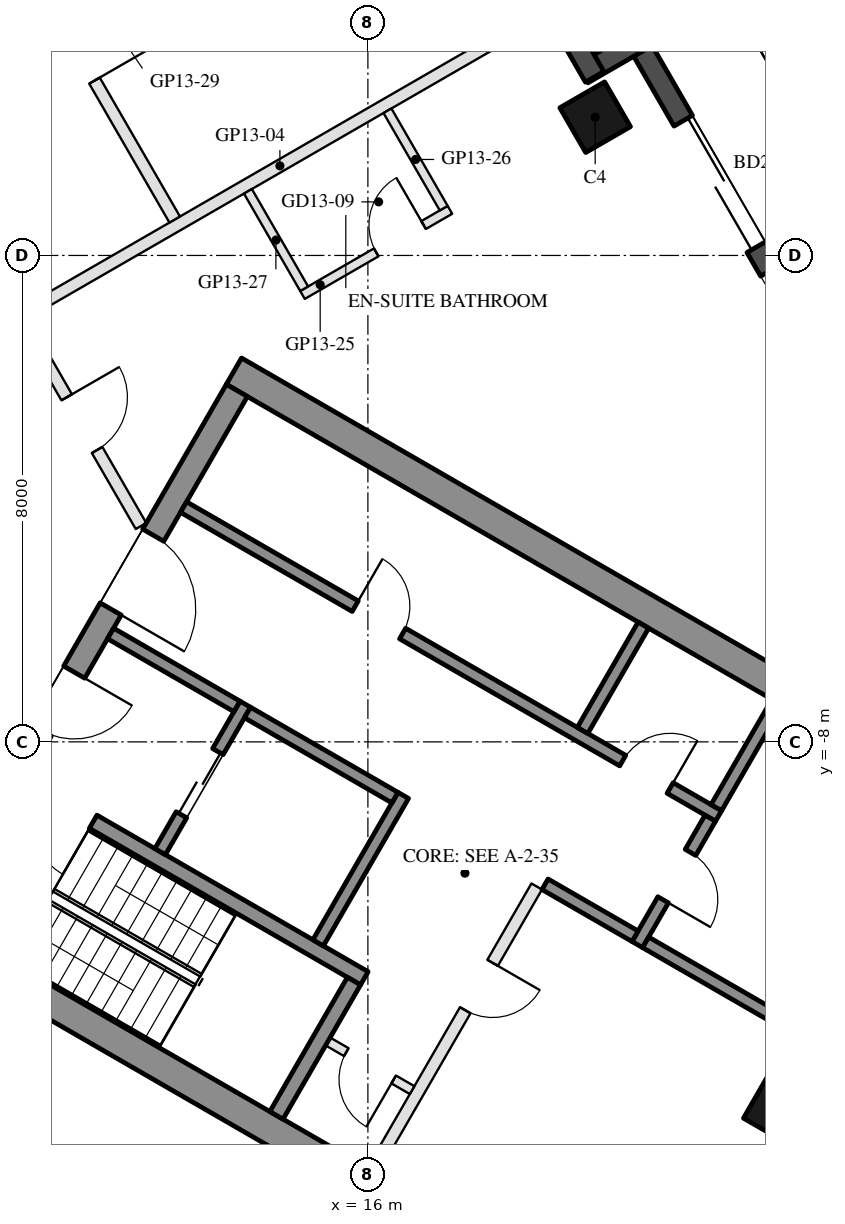
"""IFC4 building model, lengths in metres.
Left out: names, types, materials, properties, quantities, classifications, styles, units other than length and angle.
Written with IfcOpenShell. Run it as: python <this file> out.ifc"""

import sys

from ifc_helpers import new_model, si_unit, direction, frame, frame_2d, origin, origin_2d, place, context, subcontext, project, spatial, rectangle, hollow_rectangle, extrude, element, fill, save


model = new_model("IFC4")
c1 = context("Model", 3, precision=1e-05, world=origin(), true_north=direction((0.0, 1.0)))
c2 = subcontext(c1, "Body", "Model", "MODEL_VIEW")
j1 = project(units=[si_unit("LENGTHUNIT", "METRE"), si_unit("PLANEANGLEUNIT", "RADIAN")], contexts=[c1])
p1 = place(None, origin())
s1 = spatial("IfcSite", under=j1, at=p1, CompositionType="ELEMENT")
p2 = place(p1, origin())
s2 = spatial("IfcBuilding", under=s1, at=p2, CompositionType="ELEMENT")
p3 = place(p2, frame((0.0, 0.0, 154.0)))
s3 = spatial("IfcBuildingStorey", under=s2, at=p3, CompositionType="ELEMENT", Elevation=154.0)
p4 = place(p3, frame((19.738, 2.273, 0.0), z_axis=(0.0, 0.0, 1.0), x_axis=(-0.5, 0.866025403784, 0.0)))
e1 = element("IfcColumn", 1, at=p4, inside=s3, PredefinedType="COLUMN", context=c2, shape_type="SweptSolid", body=[
    extrude(hollow_rectangle(XDim=0.85, YDim=0.85, WallThickness=0.04, at=origin_2d()), origin(), (0.0, 0.0, 1.0), 3.7),
])
p5 = place(p3, frame((23.729, -13.7, 0.0), z_axis=(0.0, 0.0, 1.0), x_axis=(0.5, 0.866025403784, 0.0)))
e2 = element("IfcColumn", 2, at=p5, inside=s3, PredefinedType="COLUMN", context=c2, shape_type="SweptSolid", body=[
    extrude(hollow_rectangle(XDim=2.4, YDim=2.2, WallThickness=0.06, at=origin_2d()), origin(), (0.0, 0.0, 1.0), 3.7),
])
p6 = place(p3, frame((26.257, -6.567, 0.0), z_axis=(0.0, 0.0, 1.0), x_axis=(-0.500023526245, 0.866011820475, 0.0)))
e3 = element("IfcWall", 3, at=p6, inside=s3, PredefinedType="SOLIDWALL", context=c2, shape_type="SweptSolid", body=[
    extrude(rectangle(XDim=11.816, YDim=0.35, at=frame_2d((5.908, 0.0))), origin(), (0.0, 0.0, 1.0), 3.55),
])
p7 = place(p6, frame((0.38, 0.0, 0.3)))
e4 = element("IfcOpeningElement", 4, at=p7, cuts=e3, PredefinedType="OPENING", context=c2, shape_type="SweptSolid", body=[
    extrude(rectangle(XDim=1.8, YDim=2.65, at=frame_2d((0.9, 1.325))), frame((0.0, 0.185, 0.0), z_axis=(0.0, -1.0, 0.0), x_axis=(1.0, 0.0, 0.0)), (0.0, 0.0, 1.0), 0.37),
])
p8 = place(p6, frame((7.741, 0.0, 0.0)))
e5 = element("IfcOpeningElement", 5, at=p8, cuts=e3, PredefinedType="OPENING", context=c2, shape_type="SweptSolid", body=[
    extrude(rectangle(XDim=2.4, YDim=2.4, at=frame_2d((1.2, 1.2))), frame((0.0, 0.185, 0.0), z_axis=(0.0, -1.0, 0.0), x_axis=(1.0, 0.0, 0.0)), (0.0, 0.0, 1.0), 0.37),
])
p9 = place(p6, frame((3.791, 0.0, 0.3)))
e6 = element("IfcOpeningElement", 6, at=p9, cuts=e3, PredefinedType="OPENING", context=c2, shape_type="SweptSolid", body=[
    extrude(rectangle(XDim=1.6, YDim=2.65, at=frame_2d((0.8, 1.325))), frame((0.0, 0.185, 0.0), z_axis=(0.0, -1.0, 0.0), x_axis=(1.0, 0.0, 0.0)), (0.0, 0.0, 1.0), 0.37),
])
p10 = place(p6, frame((5.691, 0.0, 0.3)))
e7 = element("IfcOpeningElement", 7, at=p10, cuts=e3, PredefinedType="OPENING", context=c2, shape_type="SweptSolid", body=[
    extrude(rectangle(XDim=1.6, YDim=2.65, at=frame_2d((0.8, 1.325))), frame((0.0, 0.185, 0.0), z_axis=(0.0, -1.0, 0.0), x_axis=(1.0, 0.0, 0.0)), (0.0, 0.0, 1.0), 0.37),
])
p11 = place(p3, frame((20.588, 3.601, 0.0), z_axis=(0.0, 0.0, 1.0), x_axis=(-0.866005645448, -0.500034220881, 0.0)))
e8 = element("IfcWall", 8, at=p11, inside=s3, PredefinedType="SOLIDWALL", context=c2, shape_type="SweptSolid", body=[
    extrude(rectangle(XDim=1.22, YDim=0.35, at=frame_2d((0.61, 0.0))), origin(), (0.0, 0.0, 1.0), 3.55),
])
p12 = place(p3, frame((19.729, 2.938, 0.0), z_axis=(0.0, 0.0, 1.0), x_axis=(-0.499976430342, 0.866039011305, 0.0)))
e9 = element("IfcWall", 9, at=p12, inside=s3, PredefinedType="SOLIDWALL", context=c2, shape_type="SweptSolid", body=[
    extrude(rectangle(XDim=6.74, YDim=0.35, at=frame_2d((3.37, 0.0))), origin(), (0.0, 0.0, 1.0), 3.55),
])
p13 = place(p12, frame((1.77, 0.0, 0.0)))
e10 = element("IfcOpeningElement", 10, at=p13, cuts=e9, PredefinedType="OPENING", context=c2, shape_type="SweptSolid", body=[
    extrude(rectangle(XDim=2.4, YDim=2.4, at=frame_2d((1.2, 1.2))), frame((0.0, 0.185, 0.0), z_axis=(0.0, -1.0, 0.0), x_axis=(1.0, 0.0, 0.0)), (0.0, 0.0, 1.0), 0.37),
])
p14 = place(p12, frame((4.47, 0.0, 0.3)))
e11 = element("IfcOpeningElement", 11, at=p14, cuts=e9, PredefinedType="OPENING", context=c2, shape_type="SweptSolid", body=[
    extrude(rectangle(XDim=1.5, YDim=2.65, at=frame_2d((0.75, 1.325))), frame((0.0, 0.185, 0.0), z_axis=(0.0, -1.0, 0.0), x_axis=(1.0, 0.0, 0.0)), (0.0, 0.0, 1.0), 0.37),
])
for number, where, z_axis, x_axis in (
    (12, (8.547, -10.997, 0.0), (0.0, 0.0, 1.0), (0.866, -0.5, 0.0)),
    (13, (13.797, -1.903, 0.0), (0.0, 0.0, 1.0), (0.866, -0.5, 0.0)),
):
    element("IfcWall", number, at=place(p3, frame(where, z_axis=z_axis, x_axis=x_axis)), inside=s3, PredefinedType="SHEAR", context=c2, shape_type="SweptSolid", body=[
        extrude(rectangle(XDim=14.837, YDim=0.5, at=frame_2d((7.418, 0.0))), origin(), (0.0, 0.0, 1.0), 3.5),
    ])
p15 = place(p3, frame((8.845, -10.88, 0.0), z_axis=(0.0, 0.0, 1.0), x_axis=(0.500004234368, 0.866022959057, 0.0)))
e14 = element("IfcWall", 14, at=p15, inside=s3, PredefinedType="SHEAR", context=c2, shape_type="SweptSolid", body=[
    extrude(rectangle(XDim=10.0, YDim=0.4, at=frame_2d((5.0, 0.0))), origin(), (0.0, 0.0, 1.0), 3.5),
])
p16 = place(p15, frame((3.55, 0.0, 0.0)))
e15 = element("IfcOpeningElement", 15, at=p16, cuts=e14, PredefinedType="OPENING", context=c2, shape_type="SweptSolid", body=[
    extrude(rectangle(XDim=1.1, YDim=2.1, at=frame_2d((0.55, 1.05))), frame((0.0, 0.21, 0.0), z_axis=(0.0, -1.0, 0.0), x_axis=(1.0, 0.0, 0.0)), (0.0, 0.0, 1.0), 0.42),
])
p17 = place(p15, frame((5.85, 0.0, 0.0)))
e16 = element("IfcOpeningElement", 16, at=p17, cuts=e14, PredefinedType="OPENING", context=c2, shape_type="SweptSolid", body=[
    extrude(rectangle(XDim=1.4, YDim=2.1, at=frame_2d((0.7, 1.05))), frame((0.0, 0.21, 0.0), z_axis=(0.0, -1.0, 0.0), x_axis=(1.0, 0.0, 0.0)), (0.0, 0.0, 1.0), 0.42),
])
p18 = place(p3, frame((10.356, -8.664, 0.0), z_axis=(0.0, 0.0, 1.0), x_axis=(0.866028629588, -0.499994412703, 0.0)))
e17 = element("IfcWall", 17, at=p18, inside=s3, PredefinedType="SHEAR", context=c2, shape_type="SweptSolid", body=[
    extrude(rectangle(XDim=6.45, YDim=0.25, at=frame_2d((3.225, 0.0))), origin(), (0.0, 0.0, 1.0), 3.5),
])
p19 = place(p18, frame((0.3, 0.0, 0.0)))
e18 = element("IfcOpeningElement", 18, at=p19, cuts=e17, PredefinedType="OPENING", context=c2, shape_type="SweptSolid", body=[
    extrude(rectangle(XDim=1.0, YDim=2.1, at=frame_2d((0.5, 1.05))), frame((0.0, 0.135, 0.0), z_axis=(0.0, -1.0, 0.0), x_axis=(1.0, 0.0, 0.0)), (0.0, 0.0, 1.0), 0.27),
])
p20 = place(p3, frame((14.496, -14.143, 0.0), z_axis=(0.0, 0.0, 1.0), x_axis=(0.500062241894, 0.865989465428, 0.0)))
e19 = element("IfcWall", 19, at=p20, inside=s3, PredefinedType="SHEAR", context=c2, shape_type="SweptSolid", body=[
    extrude(rectangle(XDim=2.55, YDim=0.25, at=frame_2d((1.275, 0.0))), origin(), (0.0, 0.0, 1.0), 3.5),
])
p21 = place(p3, frame((15.181, -11.305, 0.0), z_axis=(0.0, 0.0, 1.0), x_axis=(0.49994636267, 0.866056369097, 0.0)))
e20 = element("IfcWall", 20, at=p21, inside=s3, PredefinedType="SHEAR", context=c2, shape_type="SweptSolid", body=[
    extrude(rectangle(XDim=2.8, YDim=0.2, at=frame_2d((1.4, 0.0))), origin(), (0.0, 0.0, 1.0), 3.5),
])
p22 = place(p3, frame((12.583, -9.805, 0.0), z_axis=(0.0, 0.0, 1.0), x_axis=(0.49994636267, 0.866056369097, 0.0)))
e21 = element("IfcWall", 21, at=p22, inside=s3, PredefinedType="SHEAR", context=c2, shape_type="SweptSolid", body=[
    extrude(rectangle(XDim=2.8, YDim=0.2, at=frame_2d((1.4, 0.0))), origin(), (0.0, 0.0, 1.0), 3.5),
])
p23 = place(p22, frame((0.7, 0.0, 0.0)))
e22 = element("IfcOpeningElement", 22, at=p23, cuts=e21, PredefinedType="OPENING", context=c2, shape_type="SweptSolid", body=[
    extrude(rectangle(XDim=1.2, YDim=2.1, at=frame_2d((0.6, 1.05))), frame((0.0, 0.11, 0.0), z_axis=(0.0, -1.0, 0.0), x_axis=(1.0, 0.0, 0.0)), (0.0, 0.0, 1.0), 0.22),
])
p24 = place(p3, frame((11.768, -6.217, 0.0), z_axis=(0.0, 0.0, 1.0), x_axis=(0.866050077142, -0.499957262057, 0.0)))
e23 = element("IfcWall", 23, at=p24, inside=s3, PredefinedType="SHEAR", context=c2, shape_type="SweptSolid", body=[
    extrude(rectangle(XDim=2.4, YDim=0.2, at=frame_2d((1.2, 0.0))), origin(), (0.0, 0.0, 1.0), 3.5),
])
p25 = place(p3, frame((14.02, -7.517, 0.0), z_axis=(0.0, 0.0, 1.0), x_axis=(0.866034573852, -0.49998411664, 0.0)))
e24 = element("IfcWall", 24, at=p25, inside=s3, PredefinedType="SHEAR", context=c2, shape_type="SweptSolid", body=[
    extrude(rectangle(XDim=2.8, YDim=0.2, at=frame_2d((1.4, 0.0))), origin(), (0.0, 0.0, 1.0), 3.5),
])
p26 = place(p3, frame((12.968, -4.138, 0.0), z_axis=(0.0, 0.0, 1.0), x_axis=(0.866028328073, -0.49999493495, 0.0)))
e25 = element("IfcWall", 25, at=p26, inside=s3, PredefinedType="SHEAR", context=c2, shape_type="SweptSolid", body=[
    extrude(rectangle(XDim=10.16, YDim=0.2, at=frame_2d((5.08, 0.0))), origin(), (0.0, 0.0, 1.0), 3.5),
])
p27 = place(p26, frame((3.26, 0.0, 0.0)))
e26 = element("IfcOpeningElement", 26, at=p27, cuts=e25, PredefinedType="OPENING", context=c2, shape_type="SweptSolid", body=[
    extrude(rectangle(XDim=0.9, YDim=2.1, at=frame_2d((0.45, 1.05))), frame((0.0, 0.11, 0.0), z_axis=(0.0, -1.0, 0.0), x_axis=(1.0, 0.0, 0.0)), (0.0, 0.0, 1.0), 0.22),
])
p28 = place(p26, frame((8.34, 0.0, 0.0)))
e27 = element("IfcOpeningElement", 27, at=p28, cuts=e25, PredefinedType="OPENING", context=c2, shape_type="SweptSolid", body=[
    extrude(rectangle(XDim=0.9, YDim=2.1, at=frame_2d((0.45, 1.05))), frame((0.0, 0.11, 0.0), z_axis=(0.0, -1.0, 0.0), x_axis=(1.0, 0.0, 0.0)), (0.0, 0.0, 1.0), 0.22),
])
p29 = place(p3, frame((20.43, -11.333, 0.0), z_axis=(0.0, 0.0, 1.0), x_axis=(0.500001309137, 0.866024647952, 0.0)))
e28 = element("IfcWall", 28, at=p29, inside=s3, PredefinedType="SHEAR", context=c2, shape_type="SweptSolid", body=[
    extrude(rectangle(XDim=2.4, YDim=0.2, at=frame_2d((1.2, 0.0))), origin(), (0.0, 0.0, 1.0), 3.5),
])
p30 = place(p29, frame((0.85, 0.0, 0.0)))
e29 = element("IfcOpeningElement", 29, at=p30, cuts=e28, PredefinedType="OPENING", context=c2, shape_type="SweptSolid", body=[
    extrude(rectangle(XDim=0.9, YDim=2.1, at=frame_2d((0.45, 1.05))), frame((0.0, 0.11, 0.0), z_axis=(0.0, -1.0, 0.0), x_axis=(1.0, 0.0, 0.0)), (0.0, 0.0, 1.0), 0.22),
])
p31 = place(p3, frame((18.913, -10.342, 0.0), z_axis=(0.0, 0.0, 1.0), x_axis=(0.866038183914, -0.499977863513, 0.0)))
e30 = element("IfcWall", 30, at=p31, inside=s3, PredefinedType="SHEAR", context=c2, shape_type="SweptSolid", body=[
    extrude(rectangle(XDim=1.71, YDim=0.2, at=frame_2d((0.855, 0.0))), origin(), (0.0, 0.0, 1.0), 3.5),
])
for number, where, z_axis, x_axis in (
    (31, (19.531, -7.812, 0.0), (0.0, 0.0, 1.0), (0.5, 0.866, 0.0)),
    (32, (21.73, -9.082, 0.0), (0.0, 0.0, 1.0), (0.5, 0.866, 0.0)),
):
    element("IfcWall", number, at=place(p3, frame(where, z_axis=z_axis, x_axis=x_axis)), inside=s3, PredefinedType="SHEAR", context=c2, shape_type="SweptSolid", body=[
        extrude(rectangle(XDim=2.0, YDim=0.2, at=frame_2d((1.0, 0.0))), origin(), (0.0, 0.0, 1.0), 3.5),
    ])
p32 = place(p3, frame((20.567, -11.297, 0.0), z_axis=(0.0, 0.0, 1.0), x_axis=(0.866055327414, -0.49994816717, 0.0)))
e33 = element("IfcWall", 33, at=p32, inside=s3, PredefinedType="SHEAR", context=c2, shape_type="SweptSolid", body=[
    extrude(rectangle(XDim=2.84, YDim=0.2, at=frame_2d((1.42, 0.0))), origin(), (0.0, 0.0, 1.0), 3.5),
])
p33 = place(p3, frame((16.076, -15.055, 0.0), z_axis=(0.0, 0.0, 1.0), x_axis=(0.499995103361, 0.866028230842, 0.0)))
e34 = element("IfcWall", 34, at=p33, inside=s3, PredefinedType="PARTITIONING", context=c2, shape_type="SweptSolid", body=[
    extrude(rectangle(XDim=5.4, YDim=0.2, at=frame_2d((2.7, 0.0))), origin(), (0.0, 0.0, 1.0), 3.5),
])
p34 = place(p33, frame((3.05, 0.0, 0.0)))
e35 = element("IfcOpeningElement", 35, at=p34, cuts=e34, PredefinedType="OPENING", context=c2, shape_type="SweptSolid", body=[
    extrude(rectangle(XDim=0.9, YDim=2.1, at=frame_2d((0.45, 1.05))), frame((0.0, 0.11, 0.0), z_axis=(0.0, -1.0, 0.0), x_axis=(1.0, 0.0, 0.0)), (0.0, 0.0, 1.0), 0.22),
])
p35 = place(p3, frame((15.342, -12.928, 0.0), z_axis=(0.0, 0.0, 1.0), x_axis=(0.865989903783, -0.500061482766, 0.0)))
e36 = element("IfcWall", 36, at=p35, inside=s3, PredefinedType="PARTITIONING", context=c2, shape_type="SweptSolid", body=[
    extrude(rectangle(XDim=1.6, YDim=0.15, at=frame_2d((0.8, 0.0))), origin(), (0.0, 0.0, 1.0), 3.5),
])
p36 = place(p35, frame((0.35, 0.0, 0.0)))
e37 = element("IfcOpeningElement", 37, at=p36, cuts=e36, PredefinedType="OPENING", context=c2, shape_type="SweptSolid", body=[
    extrude(rectangle(XDim=0.9, YDim=2.1, at=frame_2d((0.45, 1.05))), frame((0.0, 0.085, 0.0), z_axis=(0.0, -1.0, 0.0), x_axis=(1.0, 0.0, 0.0)), (0.0, 0.0, 1.0), 0.17),
])
p37 = place(p3, frame((18.917, 3.994, 0.0), z_axis=(0.0, 0.0, 1.0), x_axis=(-0.866022637375, -0.500004791531, 0.0)))
e38 = element("IfcWall", 38, at=p37, inside=s3, PredefinedType="PARTITIONING", context=c2, shape_type="SweptSolid", body=[
    extrude(rectangle(XDim=10.08, YDim=0.2, at=frame_2d((5.04, 0.0))), origin(), (0.0, 0.0, 1.0), 3.06),
])
p38 = place(p3, frame((10.325, -1.083, 0.0), z_axis=(0.0, 0.0, 1.0), x_axis=(0.500008716408, -0.866020371305, 0.0)))
e39 = element("IfcWall", 39, at=p38, inside=s3, PredefinedType="PARTITIONING", context=c2, shape_type="SweptSolid", body=[
    extrude(rectangle(XDim=3.888, YDim=0.2, at=frame_2d((1.944, 0.0))), origin(), (0.0, 0.0, 1.0), 2.95),
])
p39 = place(p38, frame((1.444, 0.0, 0.0)))
e40 = element("IfcOpeningElement", 40, at=p39, cuts=e39, PredefinedType="OPENING", context=c2, shape_type="SweptSolid", body=[
    extrude(rectangle(XDim=1.0, YDim=2.1, at=frame_2d((0.5, 1.05))), frame((0.0, 0.11, 0.0), z_axis=(0.0, -1.0, 0.0), x_axis=(1.0, 0.0, 0.0)), (0.0, 0.0, 1.0), 0.22),
])
p40 = place(p3, frame((14.924, -0.65, 0.0), z_axis=(0.0, 0.0, 1.0), x_axis=(0.866056369097, 0.49994636267, 0.0)))
e41 = element("IfcWall", 41, at=p40, inside=s3, PredefinedType="PARTITIONING", context=c2, shape_type="SweptSolid", body=[
    extrude(rectangle(XDim=2.8, YDim=0.15, at=frame_2d((1.4, 0.0))), origin(), (0.0, 0.0, 1.0), 2.95),
])
p41 = place(p40, frame((1.4, 0.0, 0.0)))
e42 = element("IfcOpeningElement", 42, at=p41, cuts=e41, PredefinedType="OPENING", context=c2, shape_type="SweptSolid", body=[
    extrude(rectangle(XDim=0.9, YDim=2.1, at=frame_2d((0.45, 1.05))), frame((0.0, 0.085, 0.0), z_axis=(0.0, -1.0, 0.0), x_axis=(1.0, 0.0, 0.0)), (0.0, 0.0, 1.0), 0.17),
])
for number, where, z_axis, x_axis in (
    (43, (17.247, 0.778, 0.0), (0.0, 0.0, 1.0), (-0.5, 0.866, 0.0)),
    (44, (14.952, -0.547, 0.0), (0.0, 0.0, 1.0), (-0.5, 0.866, 0.0)),
):
    element("IfcWall", number, at=place(p3, frame(where, z_axis=z_axis, x_axis=x_axis)), inside=s3, PredefinedType="PARTITIONING", context=c2, shape_type="SweptSolid", body=[
        extrude(rectangle(XDim=1.85, YDim=0.15, at=frame_2d((0.925, 0.0))), origin(), (0.0, 0.0, 1.0), 2.95),
    ])
p42 = place(p3, frame((9.777, 5.867, 0.0), z_axis=(0.0, 0.0, 1.0), x_axis=(0.499996493545, -0.866027428228, 0.0)))
e45 = element("IfcWall", 45, at=p42, inside=s3, PredefinedType="PARTITIONING", context=c2, shape_type="SweptSolid", body=[
    extrude(rectangle(XDim=6.092, YDim=0.2, at=frame_2d((3.046, 0.0))), origin(), (0.0, 0.0, 1.0), 2.95),
])
p43 = place(p42, frame((2.454, 0.0, 0.0)))
e46 = element("IfcOpeningElement", 46, at=p43, cuts=e45, PredefinedType="OPENING", context=c2, shape_type="SweptSolid", body=[
    extrude(rectangle(XDim=1.0, YDim=2.1, at=frame_2d((0.5, 1.05))), frame((0.0, 0.11, 0.0), z_axis=(0.0, -1.0, 0.0), x_axis=(1.0, 0.0, 0.0)), (0.0, 0.0, 1.0), 0.22),
])
p44 = place(p8, frame((2.4, 0.0, 0.0), z_axis=(0.0, 0.0, 1.0), x_axis=(-1.0, 0.0, 0.0)))
e47 = element("IfcDoor", 47, at=p44, inside=s3, OperationType="SLIDING_TO_LEFT", PredefinedType="DOOR", context=c2, shape_type="SweptSolid", body=[
    extrude(rectangle(XDim=2.4, YDim=2.4, at=frame_2d((1.2, 1.2))), frame((0.0, 0.025, 0.0), z_axis=(0.0, -1.0, 0.0), x_axis=(1.0, 0.0, 0.0)), (0.0, 0.0, 1.0), 0.05),
])
fill(e5, e47)
p45 = place(p23, origin())
e48 = element("IfcDoor", 48, at=p45, inside=s3, OperationType="DOUBLE_DOOR_SLIDING", PredefinedType="DOOR", context=c2, shape_type="SweptSolid", body=[
    extrude(rectangle(XDim=1.2, YDim=2.1, at=frame_2d((0.6, 1.05))), frame((0.0, 0.025, 0.0), z_axis=(0.0, -1.0, 0.0), x_axis=(1.0, 0.0, 0.0)), (0.0, 0.0, 1.0), 0.05),
])
fill(e22, e48)
p46 = place(p36, frame((0.9, 0.0, 0.0), z_axis=(0.0, 0.0, 1.0), x_axis=(-1.0, 0.0, 0.0)))
e49 = element("IfcDoor", 49, at=p46, inside=s3, OperationType="SINGLE_SWING_LEFT", PredefinedType="DOOR", context=c2, shape_type="SweptSolid", body=[
    extrude(rectangle(XDim=0.9, YDim=2.1, at=frame_2d((0.45, 1.05))), frame((0.0, 0.025, 0.0), z_axis=(0.0, -1.0, 0.0), x_axis=(1.0, 0.0, 0.0)), (0.0, 0.0, 1.0), 0.05),
])
fill(e37, e49)
p47 = place(p27, origin())
e50 = element("IfcDoor", 50, at=p47, inside=s3, OperationType="SINGLE_SWING_LEFT", PredefinedType="DOOR", context=c2, shape_type="SweptSolid", body=[
    extrude(rectangle(XDim=0.9, YDim=2.1, at=frame_2d((0.45, 1.05))), frame((0.0, 0.025, 0.0), z_axis=(0.0, -1.0, 0.0), x_axis=(1.0, 0.0, 0.0)), (0.0, 0.0, 1.0), 0.05),
])
fill(e26, e50)
p48 = place(p28, origin())
e51 = element("IfcDoor", 51, at=p48, inside=s3, OperationType="SINGLE_SWING_RIGHT", PredefinedType="DOOR", context=c2, shape_type="SweptSolid", body=[
    extrude(rectangle(XDim=0.9, YDim=2.1, at=frame_2d((0.45, 1.05))), frame((0.0, 0.025, 0.0), z_axis=(0.0, -1.0, 0.0), x_axis=(1.0, 0.0, 0.0)), (0.0, 0.0, 1.0), 0.05),
])
fill(e27, e51)
p49 = place(p30, frame((0.9, 0.0, 0.0), z_axis=(0.0, 0.0, 1.0), x_axis=(-1.0, 0.0, 0.0)))
e52 = element("IfcDoor", 52, at=p49, inside=s3, OperationType="SINGLE_SWING_RIGHT", PredefinedType="DOOR", context=c2, shape_type="SweptSolid", body=[
    extrude(rectangle(XDim=0.9, YDim=2.1, at=frame_2d((0.45, 1.05))), frame((0.0, 0.025, 0.0), z_axis=(0.0, -1.0, 0.0), x_axis=(1.0, 0.0, 0.0)), (0.0, 0.0, 1.0), 0.05),
])
fill(e29, e52)
p50 = place(p34, frame((0.9, 0.0, 0.0), z_axis=(0.0, 0.0, 1.0), x_axis=(-1.0, 0.0, 0.0)))
e53 = element("IfcDoor", 53, at=p50, inside=s3, OperationType="SINGLE_SWING_LEFT", PredefinedType="DOOR", context=c2, shape_type="SweptSolid", body=[
    extrude(rectangle(XDim=0.9, YDim=2.1, at=frame_2d((0.45, 1.05))), frame((0.0, 0.025, 0.0), z_axis=(0.0, -1.0, 0.0), x_axis=(1.0, 0.0, 0.0)), (0.0, 0.0, 1.0), 0.05),
])
fill(e35, e53)
p51 = place(p16, frame((1.1, 0.0, 0.0), z_axis=(0.0, 0.0, 1.0), x_axis=(-1.0, 0.0, 0.0)))
e54 = element("IfcDoor", 54, at=p51, inside=s3, OperationType="SINGLE_SWING_LEFT", PredefinedType="DOOR", context=c2, shape_type="SweptSolid", body=[
    extrude(rectangle(XDim=1.1, YDim=2.1, at=frame_2d((0.55, 1.05))), frame((0.0, 0.025, 0.0), z_axis=(0.0, -1.0, 0.0), x_axis=(1.0, 0.0, 0.0)), (0.0, 0.0, 1.0), 0.05),
])
fill(e15, e54)
p52 = place(p17, frame((1.4, 0.0, 0.0), z_axis=(0.0, 0.0, 1.0), x_axis=(-1.0, 0.0, 0.0)))
e55 = element("IfcDoor", 55, at=p52, inside=s3, OperationType="DOUBLE_DOOR_SINGLE_SWING", PredefinedType="DOOR", context=c2, shape_type="SweptSolid", body=[
    extrude(rectangle(XDim=1.4, YDim=2.1, at=frame_2d((0.7, 1.05))), frame((0.0, 0.025, 0.0), z_axis=(0.0, -1.0, 0.0), x_axis=(1.0, 0.0, 0.0)), (0.0, 0.0, 1.0), 0.05),
])
fill(e16, e55)
p53 = place(p19, frame((1.0, 0.0, 0.0), z_axis=(0.0, 0.0, 1.0), x_axis=(-1.0, 0.0, 0.0)))
e56 = element("IfcDoor", 56, at=p53, inside=s3, OperationType="SINGLE_SWING_LEFT", PredefinedType="DOOR", context=c2, shape_type="SweptSolid", body=[
    extrude(rectangle(XDim=1.0, YDim=2.1, at=frame_2d((0.5, 1.05))), frame((0.0, 0.025, 0.0), z_axis=(0.0, -1.0, 0.0), x_axis=(1.0, 0.0, 0.0)), (0.0, 0.0, 1.0), 0.05),
])
fill(e18, e56)
p54 = place(p41, origin())
e57 = element("IfcDoor", 57, at=p54, inside=s3, OperationType="SINGLE_SWING_RIGHT", PredefinedType="DOOR", context=c2, shape_type="SweptSolid", body=[
    extrude(rectangle(XDim=0.9, YDim=2.1, at=frame_2d((0.45, 1.05))), frame((0.0, 0.025, 0.0), z_axis=(0.0, -1.0, 0.0), x_axis=(1.0, 0.0, 0.0)), (0.0, 0.0, 1.0), 0.05),
])
fill(e42, e57)
p55 = place(p39, origin())
e58 = element("IfcDoor", 58, at=p55, inside=s3, OperationType="SINGLE_SWING_LEFT", PredefinedType="DOOR", context=c2, shape_type="SweptSolid", body=[
    extrude(rectangle(XDim=1.0, YDim=2.1, at=frame_2d((0.5, 1.05))), frame((0.0, 0.025, 0.0), z_axis=(0.0, -1.0, 0.0), x_axis=(1.0, 0.0, 0.0)), (0.0, 0.0, 1.0), 0.05),
])
fill(e40, e58)
p56 = place(p43, origin())
e59 = element("IfcDoor", 59, at=p56, inside=s3, OperationType="SINGLE_SWING_RIGHT", PredefinedType="DOOR", context=c2, shape_type="SweptSolid", body=[
    extrude(rectangle(XDim=1.0, YDim=2.1, at=frame_2d((0.5, 1.05))), frame((0.0, 0.025, 0.0), z_axis=(0.0, -1.0, 0.0), x_axis=(1.0, 0.0, 0.0)), (0.0, 0.0, 1.0), 0.05),
])
fill(e46, e59)
save(model, sys.argv[1])
